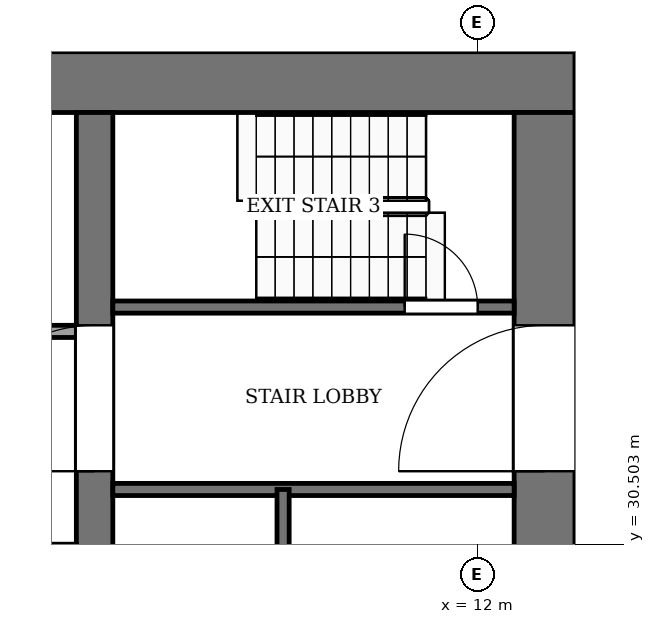
"""IFC4 building model, lengths in metres.
Left out: names, types, materials, properties, quantities, classifications, styles, units other than length and angle.
Written with IfcOpenShell. Run it as: python <this file> out.ifc"""

import sys

from ifc_helpers import new_model, si_unit, direction, frame, frame_2d, origin, place, context, subcontext, project, spatial, rectangle, extrude, element, fill, save


model = new_model("IFC4")
c1 = context("Model", 3, precision=1e-05, world=origin(), true_north=direction((0.0, 1.0)))
c2 = subcontext(c1, "Body", "Model", "MODEL_VIEW")
j1 = project(units=[si_unit("LENGTHUNIT", "METRE"), si_unit("PLANEANGLEUNIT", "RADIAN")], contexts=[c1])
p1 = place(None, origin())
s1 = spatial("IfcSite", under=j1, at=p1, CompositionType="ELEMENT")
p2 = place(p1, origin())
s2 = spatial("IfcBuilding", under=s1, at=p2, CompositionType="ELEMENT")
p3 = place(p2, frame((0.0, 0.0, 170.0)))
s3 = spatial("IfcBuildingStorey", under=s2, at=p3, CompositionType="ELEMENT", Elevation=170.0)
p4 = place(p3, frame((-13.6, 38.1, -0.25), z_axis=(0.0, 0.0, 1.0), x_axis=(1.0, 0.0, 0.0)))
e1 = element("IfcWall", 1, at=p4, inside=s3, PredefinedType="SHEAR", context=c2, shape_type="SweptSolid", body=[
    extrude(rectangle(XDim=27.2, YDim=1.0, at=frame_2d((13.6, 0.0))), origin(), (0.0, 0.0, 1.0), 7.12),
])
p5 = place(p3, frame((13.1, 18.4, -0.25), z_axis=(0.0, 0.0, 1.0), x_axis=(0.0, 1.0, 0.0)))
e2 = element("IfcWall", 2, at=p5, inside=s3, PredefinedType="SHEAR", context=c2, shape_type="SweptSolid", body=[
    extrude(rectangle(XDim=19.2, YDim=1.0, at=frame_2d((9.6, 0.0))), origin(), (0.0, 0.0, 1.0), 7.12),
])
p6 = place(p5, frame((2.8, 0.0, 0.25)))
e3 = element("IfcOpeningElement", 3, at=p6, cuts=e2, PredefinedType="OPENING", context=c2, shape_type="SweptSolid", body=[
    extrude(rectangle(XDim=2.4, YDim=2.4, at=frame_2d((1.2, 1.2))), frame((0.0, 0.51, 0.0), z_axis=(0.0, -1.0, 0.0), x_axis=(1.0, 0.0, 0.0)), (0.0, 0.0, 1.0), 1.02),
])
p7 = place(p5, frame((13.3, 0.0, 0.25)))
e4 = element("IfcOpeningElement", 4, at=p7, cuts=e2, PredefinedType="OPENING", context=c2, shape_type="SweptSolid", body=[
    extrude(rectangle(XDim=2.4, YDim=2.4, at=frame_2d((1.2, 1.2))), frame((0.0, 0.51, 0.0), z_axis=(0.0, -1.0, 0.0), x_axis=(1.0, 0.0, 0.0)), (0.0, 0.0, 1.0), 1.02),
])
p8 = place(p3, frame((5.7, 18.4, -0.25), z_axis=(0.0, 0.0, 1.0), x_axis=(0.0, 1.0, 0.0)))
e5 = element("IfcWall", 5, at=p8, inside=s3, PredefinedType="SHEAR", context=c2, shape_type="SweptSolid", body=[
    extrude(rectangle(XDim=19.2, YDim=0.6, at=frame_2d((9.6, 0.0))), origin(), (0.0, 0.0, 1.0), 7.12),
])
p9 = place(p8, frame((13.3, 0.0, 0.25)))
e6 = element("IfcOpeningElement", 6, at=p9, cuts=e5, PredefinedType="OPENING", context=c2, shape_type="SweptSolid", body=[
    extrude(rectangle(XDim=2.4, YDim=2.4, at=frame_2d((1.2, 1.2))), frame((0.0, 0.31, 0.0), z_axis=(0.0, -1.0, 0.0), x_axis=(1.0, 0.0, 0.0)), (0.0, 0.0, 1.0), 0.62),
])
p10 = place(p3, frame((6.0, 31.4, 0.0), z_axis=(0.0, 0.0, 1.0), x_axis=(1.0, 0.0, 0.0)))
e7 = element("IfcWall", 7, at=p10, inside=s3, PredefinedType="PARTITIONING", context=c2, shape_type="SweptSolid", body=[
    extrude(rectangle(XDim=6.6, YDim=0.2, at=frame_2d((3.3, 0.0))), origin(), (0.0, 0.0, 1.0), 6.87),
])
p11 = place(p3, frame((-5.4, 34.0, 0.0), z_axis=(0.0, 0.0, 1.0), x_axis=(1.0, 0.0, 0.0)))
e8 = element("IfcWall", 8, at=p11, inside=s3, PredefinedType="PARTITIONING", context=c2, shape_type="SweptSolid", body=[
    extrude(rectangle(XDim=10.8, YDim=0.2, at=frame_2d((5.4, 0.0))), origin(), (0.0, 0.0, 1.0), 6.87),
])
p12 = place(p11, frame((6.15, 0.0, 0.0)))
e9 = element("IfcOpeningElement", 9, at=p12, cuts=e8, PredefinedType="OPENING", context=c2, shape_type="SweptSolid", body=[
    extrude(rectangle(XDim=1.2, YDim=2.2, at=frame_2d((0.6, 1.1))), frame((0.0, 0.11, 0.0), z_axis=(0.0, -1.0, 0.0), x_axis=(1.0, 0.0, 0.0)), (0.0, 0.0, 1.0), 0.22),
])
p13 = place(p11, frame((8.95, 0.0, 0.0)))
e10 = element("IfcOpeningElement", 10, at=p13, cuts=e8, PredefinedType="OPENING", context=c2, shape_type="SweptSolid", body=[
    extrude(rectangle(XDim=1.0, YDim=2.1, at=frame_2d((0.5, 1.05))), frame((0.0, 0.11, 0.0), z_axis=(0.0, -1.0, 0.0), x_axis=(1.0, 0.0, 0.0)), (0.0, 0.0, 1.0), 0.22),
])
p14 = place(p3, frame((6.0, 34.4, 0.0), z_axis=(0.0, 0.0, 1.0), x_axis=(1.0, 0.0, 0.0)))
e11 = element("IfcWall", 11, at=p14, inside=s3, PredefinedType="PARTITIONING", context=c2, shape_type="SweptSolid", body=[
    extrude(rectangle(XDim=6.6, YDim=0.2, at=frame_2d((3.3, 0.0))), origin(), (0.0, 0.0, 1.0), 6.87),
])
p15 = place(p14, frame((4.8, 0.0, 0.0)))
e12 = element("IfcOpeningElement", 12, at=p15, cuts=e11, PredefinedType="OPENING", context=c2, shape_type="SweptSolid", body=[
    extrude(rectangle(XDim=1.2, YDim=2.2, at=frame_2d((0.6, 1.1))), frame((0.0, 0.11, 0.0), z_axis=(0.0, -1.0, 0.0), x_axis=(1.0, 0.0, 0.0)), (0.0, 0.0, 1.0), 0.22),
])
p16 = place(p3, frame((8.8, 24.0, 0.0), z_axis=(0.0, 0.0, 1.0), x_axis=(0.0, 1.0, 0.0)))
e13 = element("IfcWall", 13, at=p16, inside=s3, PredefinedType="PARTITIONING", context=c2, shape_type="SweptSolid", body=[
    extrude(rectangle(XDim=7.4, YDim=0.2, at=frame_2d((3.7, 0.0))), origin(), (0.0, 0.0, 1.0), 6.87),
])
p17 = place(p15, origin())
e14 = element("IfcDoor", 14, at=p17, inside=s3, OperationType="SINGLE_SWING_RIGHT", PredefinedType="DOOR", context=c2, shape_type="SweptSolid", body=[
    extrude(rectangle(XDim=1.2, YDim=2.2, at=frame_2d((0.6, 1.1))), frame((0.0, 0.025, 0.0), z_axis=(0.0, -1.0, 0.0), x_axis=(1.0, 0.0, 0.0)), (0.0, 0.0, 1.0), 0.05),
])
fill(e12, e14)
p18 = place(p9, origin())
e15 = element("IfcDoor", 15, at=p18, inside=s3, OperationType="DOUBLE_DOOR_SINGLE_SWING", PredefinedType="DOOR", context=c2, shape_type="SweptSolid", body=[
    extrude(rectangle(XDim=2.4, YDim=2.4, at=frame_2d((1.2, 1.2))), frame((0.0, 0.025, 0.0), z_axis=(0.0, -1.0, 0.0), x_axis=(1.0, 0.0, 0.0)), (0.0, 0.0, 1.0), 0.05),
])
fill(e6, e15)
p19 = place(p7, origin())
e16 = element("IfcDoor", 16, at=p19, inside=s3, OperationType="DOUBLE_DOOR_SINGLE_SWING", PredefinedType="DOOR", context=c2, shape_type="SweptSolid", body=[
    extrude(rectangle(XDim=2.4, YDim=2.4, at=frame_2d((1.2, 1.2))), frame((0.0, 0.025, 0.0), z_axis=(0.0, -1.0, 0.0), x_axis=(1.0, 0.0, 0.0)), (0.0, 0.0, 1.0), 0.05),
])
fill(e4, e16)
save(model, sys.argv[1])
